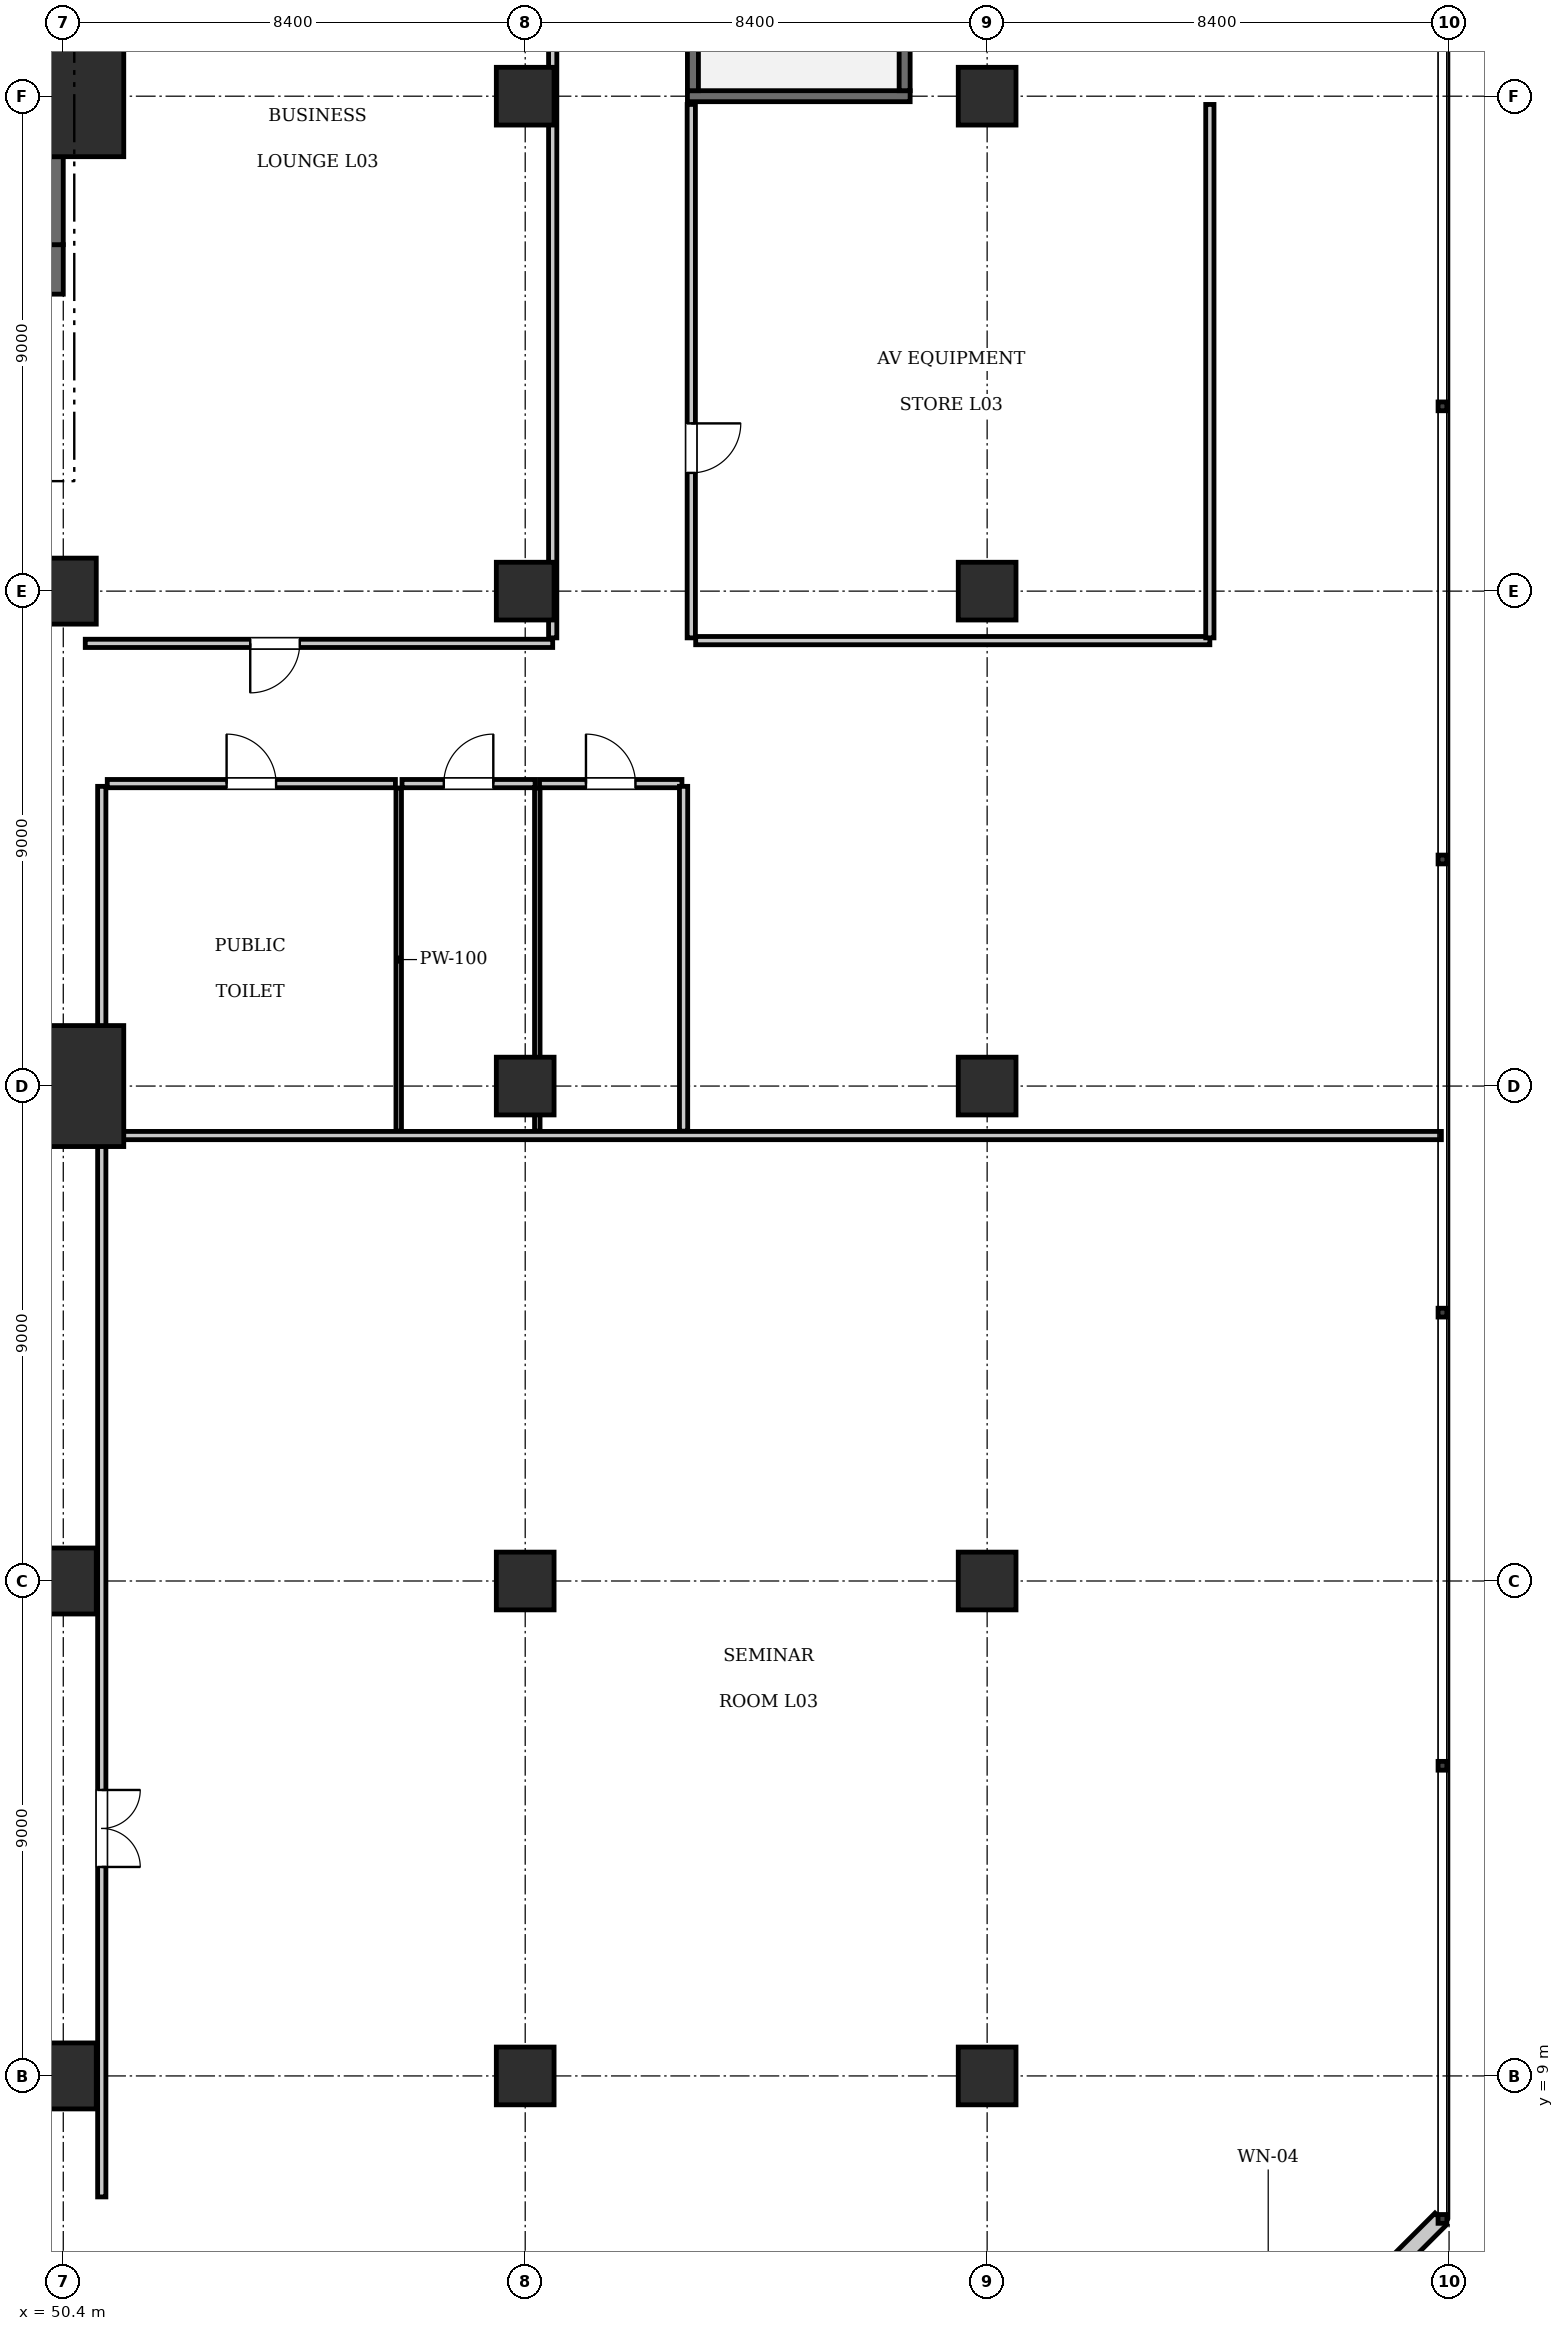
"""IFC4 building model, lengths in metres.
Left out: names, types, materials, properties, quantities, classifications, styles, units other than length and angle.
Written with IfcOpenShell. Run it as: python <this file> out.ifc"""

import sys

from ifc_helpers import new_model, si_unit, direction, frame, frame_2d, origin, origin_2d, place, context, subcontext, project, spatial, rectangle, extrude, element, fill, save


model = new_model("IFC4")
c1 = context("Model", 3, precision=1e-05, world=origin(), true_north=direction((0.0, 1.0)))
c2 = subcontext(c1, "Body", "Model", "MODEL_VIEW")
j1 = project(units=[si_unit("LENGTHUNIT", "METRE"), si_unit("PLANEANGLEUNIT", "RADIAN")], contexts=[c1])
p1 = place(None, origin())
s1 = spatial("IfcSite", under=j1, at=p1, CompositionType="ELEMENT")
p2 = place(p1, origin())
s2 = spatial("IfcBuilding", under=s1, at=p2, CompositionType="ELEMENT")
p3 = place(p2, frame((0.0, 0.0, 16.45)))
s3 = spatial("IfcBuildingStorey", under=s2, at=p3, CompositionType="ELEMENT", Elevation=16.45)
for number, where, z_axis, x_axis in (
    (1, (50.4, 27.0, 0.0), (0.0, 0.0, 1.0), (1.0, 0.0, 0.0)),
    (2, (50.4, 45.0, 0.0), (0.0, 0.0, 1.0), (1.0, 0.0, 0.0)),
):
    element("IfcColumn", number, at=place(p3, frame(where, z_axis=z_axis, x_axis=x_axis)), inside=s3, PredefinedType="COLUMN", context=c2, shape_type="SweptSolid", body=[
        extrude(rectangle(XDim=2.2, YDim=2.2, at=origin_2d()), origin(), (0.0, 0.0, 1.0), 4.9),
    ])
p4 = place(p3, frame((43.6, 41.85, 0.0), z_axis=(0.0, 0.0, 1.0), x_axis=(1.0, 0.0, 0.0)))
e3 = element("IfcWall", 3, at=p4, inside=s3, PredefinedType="SHEAR", context=c2, shape_type="SweptSolid", body=[
    extrude(rectangle(XDim=6.8, YDim=0.9, at=frame_2d((3.4, 0.0))), origin(), (0.0, 0.0, 1.0), 4.9),
])
p5 = place(p4, frame((3.9, 0.0, 0.0)))
e4 = element("IfcOpeningElement", 4, at=p5, cuts=e3, PredefinedType="OPENING", context=c2, shape_type="SweptSolid", body=[
    extrude(rectangle(XDim=1.15, YDim=2.15, at=frame_2d((0.575, 1.075))), frame((0.0, 0.46, 0.0), z_axis=(0.0, -1.0, 0.0), x_axis=(1.0, 0.0, 0.0)), (0.0, 0.0, 1.0), 0.92),
])
p6 = place(p4, frame((0.55, 0.0, 0.0)))
e5 = element("IfcOpeningElement", 5, at=p6, cuts=e3, PredefinedType="OPENING", context=c2, shape_type="SweptSolid", body=[
    extrude(rectangle(XDim=1.1, YDim=2.2, at=frame_2d((0.55, 1.1))), frame((0.0, 0.46, 0.0), z_axis=(0.0, -1.0, 0.0), x_axis=(1.0, 0.0, 0.0)), (0.0, 0.0, 1.0), 0.92),
])
p7 = place(p3, frame((49.95, 42.3, 0.0), z_axis=(0.0, 0.0, 1.0), x_axis=(0.0, 1.0, 0.0)))
e6 = element("IfcWall", 6, at=p7, inside=s3, PredefinedType="SHEAR", context=c2, shape_type="SweptSolid", body=[
    extrude(rectangle(XDim=1.6, YDim=0.9, at=frame_2d((0.8, 0.0))), origin(), (0.0, 0.0, 1.0), 4.9),
])
for number, where, z_axis, x_axis in (
    (7, (50.4, 36.0, 0.0), (0.0, 0.0, 1.0), (1.0, 0.0, 0.0)),
    (8, (50.4, 18.0, 0.0), (0.0, 0.0, 1.0), (1.0, 0.0, 0.0)),
    (9, (50.4, 9.0, 0.0), (0.0, 0.0, 1.0), (1.0, 0.0, 0.0)),
):
    element("IfcColumn", number, at=place(p3, frame(where, z_axis=z_axis, x_axis=x_axis)), inside=s3, PredefinedType="COLUMN", context=c2, shape_type="SweptSolid", body=[
        extrude(rectangle(XDim=1.2, YDim=1.2, at=origin_2d()), origin(), (0.0, 0.0, 1.0), 4.9),
    ])
for number, where, z_axis, x_axis in (
    (10, (58.8, 9.0, 0.0), (0.0, 0.0, 1.0), (1.0, 0.0, 0.0)),
    (11, (58.8, 18.0, 0.0), (0.0, 0.0, 1.0), (1.0, 0.0, 0.0)),
    (12, (58.8, 27.0, 0.0), (0.0, 0.0, 1.0), (1.0, 0.0, 0.0)),
    (13, (58.8, 36.0, 0.0), (0.0, 0.0, 1.0), (1.0, 0.0, 0.0)),
    (14, (58.8, 45.0, 0.0), (0.0, 0.0, 1.0), (1.0, 0.0, 0.0)),
    (15, (67.2, 9.0, 0.0), (0.0, 0.0, 1.0), (1.0, 0.0, 0.0)),
    (16, (67.2, 18.0, 0.0), (0.0, 0.0, 1.0), (1.0, 0.0, 0.0)),
    (17, (67.2, 27.0, 0.0), (0.0, 0.0, 1.0), (1.0, 0.0, 0.0)),
    (18, (67.2, 36.0, 0.0), (0.0, 0.0, 1.0), (1.0, 0.0, 0.0)),
    (19, (67.2, 45.0, 0.0), (0.0, 0.0, 1.0), (1.0, 0.0, 0.0)),
):
    element("IfcColumn", number, at=place(p3, frame(where, z_axis=z_axis, x_axis=x_axis)), inside=s3, PredefinedType="COLUMN", context=c2, shape_type="SweptSolid", body=[
        extrude(rectangle(XDim=1.05, YDim=1.05, at=origin_2d()), origin(), (0.0, 0.0, 1.0), 4.9),
    ])
p8 = place(p3, frame((61.75, 45.0, 0.0), z_axis=(0.0, 0.0, 1.0), x_axis=(1.0, 0.0, 0.0)))
e20 = element("IfcWall", 20, at=p8, inside=s3, PredefinedType="SOLIDWALL", context=c2, shape_type="SweptSolid", body=[
    extrude(rectangle(XDim=4.05, YDim=0.2, at=frame_2d((2.025, 0.0))), origin(), (0.0, 0.0, 1.0), 3.985),
])
p9 = place(p3, frame((61.85, 45.1, 0.0), z_axis=(0.0, 0.0, 1.0), x_axis=(0.0, 1.0, 0.0)))
e21 = element("IfcWall", 21, at=p9, inside=s3, PredefinedType="SOLIDWALL", context=c2, shape_type="SweptSolid", body=[
    extrude(rectangle(XDim=8.1, YDim=0.2, at=frame_2d((4.05, 0.0))), origin(), (0.0, 0.0, 1.0), 4.62),
])
p10 = place(p9, frame((6.32, 0.0, 0.0)))
e22 = element("IfcOpeningElement", 22, at=p10, cuts=e21, PredefinedType="OPENING", context=c2, shape_type="SweptSolid", body=[
    extrude(rectangle(XDim=1.15, YDim=2.15, at=frame_2d((0.575, 1.075))), frame((0.0, 0.11, 0.0), z_axis=(0.0, -1.0, 0.0), x_axis=(1.0, 0.0, 0.0)), (0.0, 0.0, 1.0), 0.22),
])
p11 = place(p3, frame((65.7, 45.1, 0.0), z_axis=(0.0, 0.0, 1.0), x_axis=(0.0, 1.0, 0.0)))
e23 = element("IfcWall", 23, at=p11, inside=s3, PredefinedType="SOLIDWALL", context=c2, shape_type="SweptSolid", body=[
    extrude(rectangle(XDim=8.1, YDim=0.2, at=frame_2d((4.05, 0.0))), origin(), (0.0, 0.0, 1.0), 4.62),
])
p12 = place(p3, frame((69.2, 0.15, 0.0), z_axis=(0.0, 0.0, 1.0), x_axis=(0.707106781187, 0.707106781187, 0.0)))
e24 = element("IfcWall", 24, at=p12, inside=s3, PredefinedType="SOLIDWALL", context=c2, shape_type="SweptSolid", body=[
    extrude(rectangle(XDim=8.839, YDim=0.3, at=frame_2d((4.419, 0.0))), origin(), (0.0, 0.0, 1.0), 4.62),
])
p13 = place(p12, frame((3.2, 0.0, 0.9)))
e25 = element("IfcOpeningElement", 25, at=p13, cuts=e24, PredefinedType="OPENING", context=c2, shape_type="SweptSolid", body=[
    extrude(rectangle(XDim=2.4, YDim=2.6, at=frame_2d((1.2, 1.3))), frame((0.0, 0.16, 0.0), z_axis=(0.0, -1.0, 0.0), x_axis=(1.0, 0.0, 0.0)), (0.0, 0.0, 1.0), 0.32),
])
p14 = place(p3, frame((51.2, 32.5, 0.0), z_axis=(0.0, 0.0, 1.0), x_axis=(1.0, 0.0, 0.0)))
e26 = element("IfcWall", 26, at=p14, inside=s3, PredefinedType="PARTITIONING", context=c2, shape_type="SweptSolid", body=[
    extrude(rectangle(XDim=5.24, YDim=0.15, at=frame_2d((2.62, 0.0))), origin(), (0.0, 0.0, 1.0), 4.62),
])
p15 = place(p14, frame((2.17, 0.0, 0.0)))
e27 = element("IfcOpeningElement", 27, at=p15, cuts=e26, PredefinedType="OPENING", context=c2, shape_type="SweptSolid", body=[
    extrude(rectangle(XDim=0.9, YDim=2.1, at=frame_2d((0.45, 1.05))), frame((0.0, 0.085, 0.0), z_axis=(0.0, -1.0, 0.0), x_axis=(1.0, 0.0, 0.0)), (0.0, 0.0, 1.0), 0.17),
])
p16 = place(p3, frame((56.56, 32.5, 0.0), z_axis=(0.0, 0.0, 1.0), x_axis=(1.0, 0.0, 0.0)))
e28 = element("IfcWall", 28, at=p16, inside=s3, PredefinedType="PARTITIONING", context=c2, shape_type="SweptSolid", body=[
    extrude(rectangle(XDim=2.42, YDim=0.15, at=frame_2d((1.21, 0.0))), origin(), (0.0, 0.0, 1.0), 4.62),
])
p17 = place(p16, frame((0.76, 0.0, 0.0)))
e29 = element("IfcOpeningElement", 29, at=p17, cuts=e28, PredefinedType="OPENING", context=c2, shape_type="SweptSolid", body=[
    extrude(rectangle(XDim=0.9, YDim=2.1, at=frame_2d((0.45, 1.05))), frame((0.0, 0.085, 0.0), z_axis=(0.0, -1.0, 0.0), x_axis=(1.0, 0.0, 0.0)), (0.0, 0.0, 1.0), 0.17),
])
p18 = place(p3, frame((59.06, 32.5, 0.0), z_axis=(0.0, 0.0, 1.0), x_axis=(1.0, 0.0, 0.0)))
e30 = element("IfcWall", 30, at=p18, inside=s3, PredefinedType="PARTITIONING", context=c2, shape_type="SweptSolid", body=[
    extrude(rectangle(XDim=2.59, YDim=0.15, at=frame_2d((1.295, 0.0))), origin(), (0.0, 0.0, 1.0), 4.62),
])
p19 = place(p18, frame((0.845, 0.0, 0.0)))
e31 = element("IfcOpeningElement", 31, at=p19, cuts=e30, PredefinedType="OPENING", context=c2, shape_type="SweptSolid", body=[
    extrude(rectangle(XDim=0.9, YDim=2.1, at=frame_2d((0.45, 1.05))), frame((0.0, 0.085, 0.0), z_axis=(0.0, -1.0, 0.0), x_axis=(1.0, 0.0, 0.0)), (0.0, 0.0, 1.0), 0.17),
])
for number, where, z_axis, x_axis in (
    (32, (51.1, 26.18, 0.0), (0.0, 0.0, 1.0), (0.0, 1.0, 0.0)),
    (33, (61.68, 26.18, 0.0), (0.0, 0.0, 1.0), (0.0, 1.0, 0.0)),
):
    element("IfcWall", number, at=place(p3, frame(where, z_axis=z_axis, x_axis=x_axis)), inside=s3, PredefinedType="PARTITIONING", context=c2, shape_type="SweptSolid", body=[
        extrude(rectangle(XDim=6.27, YDim=0.15, at=frame_2d((3.135, 0.0))), origin(), (0.0, 0.0, 1.0), 4.62),
    ])
for number, where, z_axis, x_axis in (
    (34, (56.5, 26.18, 0.0), (0.0, 0.0, 1.0), (0.0, 1.0, 0.0)),
    (35, (59.02, 26.18, 0.0), (0.0, 0.0, 1.0), (0.0, 1.0, 0.0)),
):
    element("IfcWall", number, at=place(p3, frame(where, z_axis=z_axis, x_axis=x_axis)), inside=s3, PredefinedType="PARTITIONING", context=c2, shape_type="SweptSolid", body=[
        extrude(rectangle(XDim=6.24, YDim=0.1, at=frame_2d((3.12, 0.0))), origin(), (0.0, 0.0, 1.0), 4.62),
    ])
p20 = place(p3, frame((51.1, 6.8, 0.0), z_axis=(0.0, 0.0, 1.0), x_axis=(0.0, 1.0, 0.0)))
e36 = element("IfcWall", 36, at=p20, inside=s3, PredefinedType="PARTITIONING", context=c2, shape_type="SweptSolid", body=[
    extrude(rectangle(XDim=19.2, YDim=0.15, at=frame_2d((9.6, 0.0))), origin(), (0.0, 0.0, 1.0), 4.62),
])
p21 = place(p20, frame((6.0, 0.0, 0.0)))
e37 = element("IfcOpeningElement", 37, at=p21, cuts=e36, PredefinedType="OPENING", context=c2, shape_type="SweptSolid", body=[
    extrude(rectangle(XDim=1.4, YDim=2.2, at=frame_2d((0.7, 1.1))), frame((0.0, 0.085, 0.0), z_axis=(0.0, -1.0, 0.0), x_axis=(1.0, 0.0, 0.0)), (0.0, 0.0, 1.0), 0.17),
])
p22 = place(p3, frame((51.12, 26.1, 0.0), z_axis=(0.0, 0.0, 1.0), x_axis=(1.0, 0.0, 0.0)))
e38 = element("IfcWall", 38, at=p22, inside=s3, PredefinedType="PARTITIONING", context=c2, shape_type="SweptSolid", body=[
    extrude(rectangle(XDim=24.34, YDim=0.15, at=frame_2d((12.17, 0.0))), origin(), (0.0, 0.0, 1.0), 4.62),
])
p23 = place(p3, frame((50.8, 35.05, 0.0), z_axis=(0.0, 0.0, 1.0), x_axis=(1.0, 0.0, 0.0)))
e39 = element("IfcWall", 39, at=p23, inside=s3, PredefinedType="PARTITIONING", context=c2, shape_type="SweptSolid", body=[
    extrude(rectangle(XDim=8.5, YDim=0.15, at=frame_2d((4.25, 0.0))), origin(), (0.0, 0.0, 1.0), 4.62),
])
p24 = place(p23, frame((3.0, 0.0, 0.0)))
e40 = element("IfcOpeningElement", 40, at=p24, cuts=e39, PredefinedType="OPENING", context=c2, shape_type="SweptSolid", body=[
    extrude(rectangle(XDim=0.9, YDim=2.1, at=frame_2d((0.45, 1.05))), frame((0.0, 0.085, 0.0), z_axis=(0.0, -1.0, 0.0), x_axis=(1.0, 0.0, 0.0)), (0.0, 0.0, 1.0), 0.17),
])
p25 = place(p3, frame((59.3, 35.15, 0.0), z_axis=(0.0, 0.0, 1.0), x_axis=(0.0, 1.0, 0.0)))
e41 = element("IfcWall", 41, at=p25, inside=s3, PredefinedType="PARTITIONING", context=c2, shape_type="SweptSolid", body=[
    extrude(rectangle(XDim=18.6, YDim=0.15, at=frame_2d((9.3, 0.0))), origin(), (0.0, 0.0, 1.0), 4.62),
])
p26 = place(p3, frame((61.82, 35.15, 0.0), z_axis=(0.0, 0.0, 1.0), x_axis=(0.0, 1.0, 0.0)))
e42 = element("IfcWall", 42, at=p26, inside=s3, PredefinedType="PARTITIONING", context=c2, shape_type="SweptSolid", body=[
    extrude(rectangle(XDim=9.7, YDim=0.15, at=frame_2d((4.85, 0.0))), origin(), (0.0, 0.0, 1.0), 4.62),
])
p27 = place(p26, frame((3.0, 0.0, 0.0)))
e43 = element("IfcOpeningElement", 43, at=p27, cuts=e42, PredefinedType="OPENING", context=c2, shape_type="SweptSolid", body=[
    extrude(rectangle(XDim=0.9, YDim=2.1, at=frame_2d((0.45, 1.05))), frame((0.0, 0.085, 0.0), z_axis=(0.0, -1.0, 0.0), x_axis=(1.0, 0.0, 0.0)), (0.0, 0.0, 1.0), 0.17),
])
p28 = place(p3, frame((61.9, 35.1, 0.0), z_axis=(0.0, 0.0, 1.0), x_axis=(1.0, 0.0, 0.0)))
e44 = element("IfcWall", 44, at=p28, inside=s3, PredefinedType="PARTITIONING", context=c2, shape_type="SweptSolid", body=[
    extrude(rectangle(XDim=9.35, YDim=0.15, at=frame_2d((4.675, 0.0))), origin(), (0.0, 0.0, 1.0), 4.62),
])
p29 = place(p3, frame((71.25, 35.15, 0.0), z_axis=(0.0, 0.0, 1.0), x_axis=(0.0, 1.0, 0.0)))
e45 = element("IfcWall", 45, at=p29, inside=s3, PredefinedType="PARTITIONING", context=c2, shape_type="SweptSolid", body=[
    extrude(rectangle(XDim=9.7, YDim=0.15, at=frame_2d((4.85, 0.0))), origin(), (0.0, 0.0, 1.0), 4.62),
])
p30 = place(p15, origin())
e46 = element("IfcDoor", 46, at=p30, inside=s3, OperationType="SINGLE_SWING_LEFT", PredefinedType="DOOR", context=c2, shape_type="SweptSolid", body=[
    extrude(rectangle(XDim=0.9, YDim=2.1, at=frame_2d((0.45, 1.05))), frame((0.0, 0.025, 0.0), z_axis=(0.0, -1.0, 0.0), x_axis=(1.0, 0.0, 0.0)), (0.0, 0.0, 1.0), 0.05),
])
fill(e27, e46)
p31 = place(p17, origin())
e47 = element("IfcDoor", 47, at=p31, inside=s3, OperationType="SINGLE_SWING_RIGHT", PredefinedType="DOOR", context=c2, shape_type="SweptSolid", body=[
    extrude(rectangle(XDim=0.9, YDim=2.1, at=frame_2d((0.45, 1.05))), frame((0.0, 0.025, 0.0), z_axis=(0.0, -1.0, 0.0), x_axis=(1.0, 0.0, 0.0)), (0.0, 0.0, 1.0), 0.05),
])
fill(e29, e47)
p32 = place(p19, origin())
e48 = element("IfcDoor", 48, at=p32, inside=s3, OperationType="SINGLE_SWING_LEFT", PredefinedType="DOOR", context=c2, shape_type="SweptSolid", body=[
    extrude(rectangle(XDim=0.9, YDim=2.1, at=frame_2d((0.45, 1.05))), frame((0.0, 0.025, 0.0), z_axis=(0.0, -1.0, 0.0), x_axis=(1.0, 0.0, 0.0)), (0.0, 0.0, 1.0), 0.05),
])
fill(e31, e48)
p33 = place(p21, frame((1.4, 0.0, 0.0), z_axis=(0.0, 0.0, 1.0), x_axis=(-1.0, 0.0, 0.0)))
e49 = element("IfcDoor", 49, at=p33, inside=s3, OperationType="DOUBLE_DOOR_SINGLE_SWING", PredefinedType="DOOR", context=c2, shape_type="SweptSolid", body=[
    extrude(rectangle(XDim=1.4, YDim=2.2, at=frame_2d((0.7, 1.1))), frame((0.0, 0.025, 0.0), z_axis=(0.0, -1.0, 0.0), x_axis=(1.0, 0.0, 0.0)), (0.0, 0.0, 1.0), 0.05),
])
fill(e37, e49)
p34 = place(p24, frame((0.9, 0.0, 0.0), z_axis=(0.0, 0.0, 1.0), x_axis=(-1.0, 0.0, 0.0)))
e50 = element("IfcDoor", 50, at=p34, inside=s3, OperationType="SINGLE_SWING_RIGHT", PredefinedType="DOOR", context=c2, shape_type="SweptSolid", body=[
    extrude(rectangle(XDim=0.9, YDim=2.1, at=frame_2d((0.45, 1.05))), frame((0.0, 0.025, 0.0), z_axis=(0.0, -1.0, 0.0), x_axis=(1.0, 0.0, 0.0)), (0.0, 0.0, 1.0), 0.05),
])
fill(e40, e50)
p35 = place(p27, frame((0.9, 0.0, 0.0), z_axis=(0.0, 0.0, 1.0), x_axis=(-1.0, 0.0, 0.0)))
e51 = element("IfcDoor", 51, at=p35, inside=s3, OperationType="SINGLE_SWING_LEFT", PredefinedType="DOOR", context=c2, shape_type="SweptSolid", body=[
    extrude(rectangle(XDim=0.9, YDim=2.1, at=frame_2d((0.45, 1.05))), frame((0.0, 0.025, 0.0), z_axis=(0.0, -1.0, 0.0), x_axis=(1.0, 0.0, 0.0)), (0.0, 0.0, 1.0), 0.05),
])
fill(e43, e51)
save(model, sys.argv[1])
